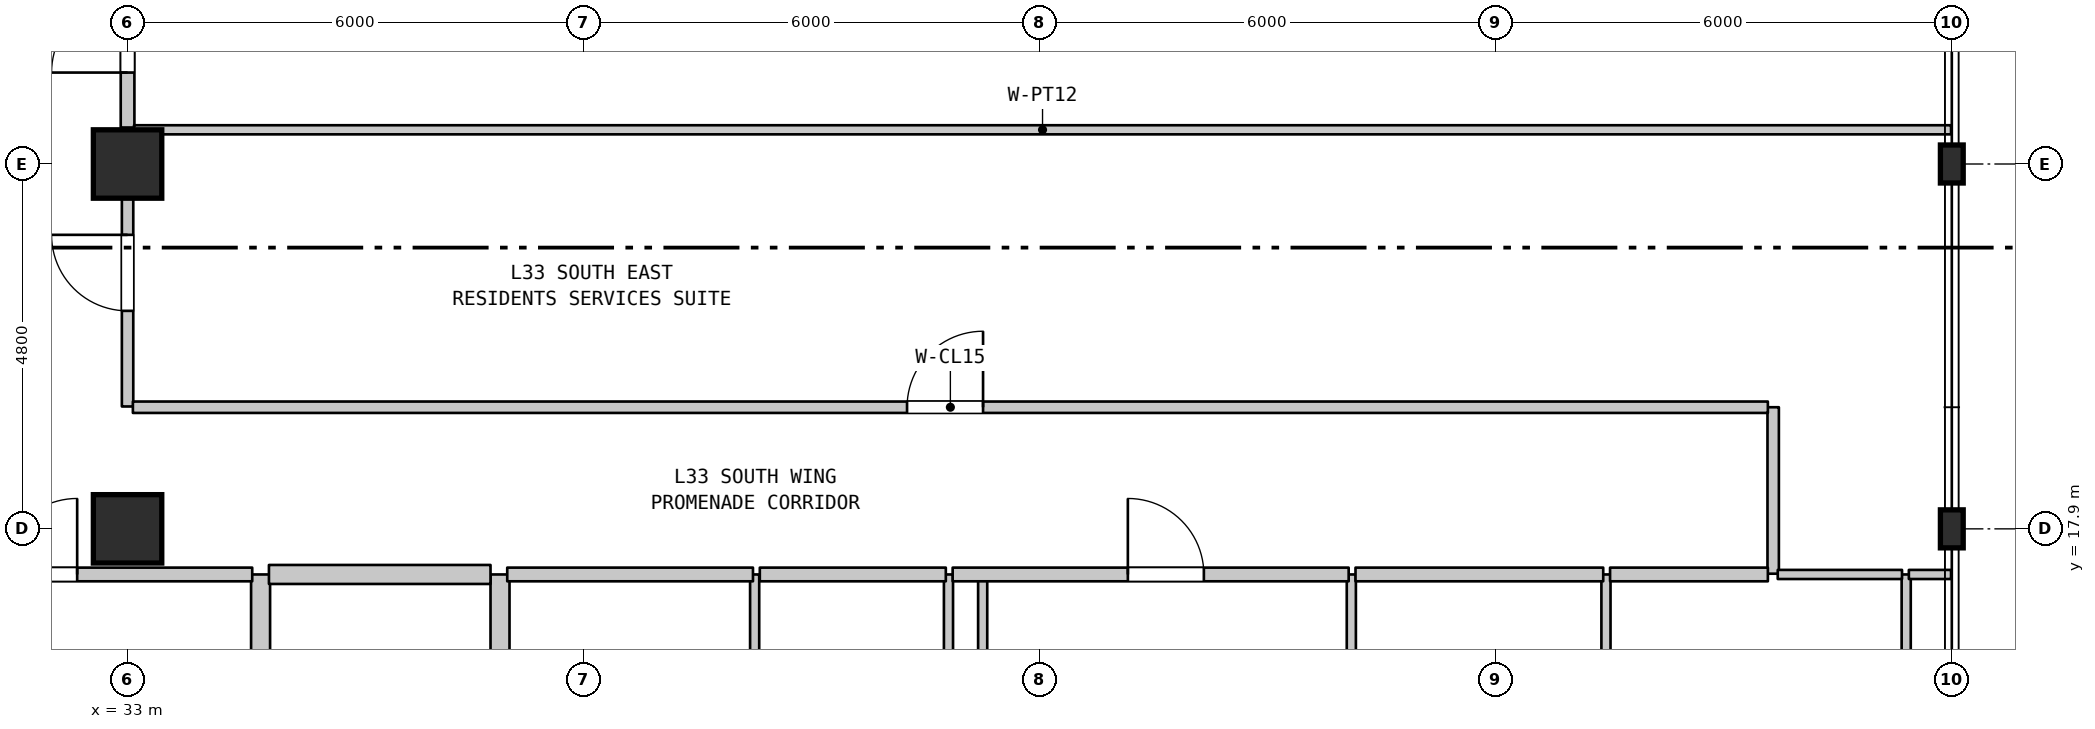
"""IFC4 building model, lengths in metres.
Left out: names, types, materials, properties, quantities, classifications, styles, units other than length and angle.
Written with IfcOpenShell. Run it as: python <this file> out.ifc"""

import sys

from ifc_helpers import new_model, si_unit, direction, frame, frame_2d, origin, origin_2d, place, context, subcontext, project, spatial, rectangle, i_section, extrude, element, fill, save


model = new_model("IFC4")
c1 = context("Model", 3, precision=1e-05, world=origin(), true_north=direction((0.0, 1.0)))
c2 = subcontext(c1, "Body", "Model", "MODEL_VIEW")
j1 = project(units=[si_unit("LENGTHUNIT", "METRE"), si_unit("PLANEANGLEUNIT", "RADIAN")], contexts=[c1])
p1 = place(None, origin())
s1 = spatial("IfcSite", under=j1, at=p1, CompositionType="ELEMENT")
p2 = place(p1, origin())
s2 = spatial("IfcBuilding", under=s1, at=p2, CompositionType="ELEMENT")
p3 = place(p2, frame((0.0, 0.0, 137.2)))
s3 = spatial("IfcBuildingStorey", under=s2, at=p3, CompositionType="ELEMENT", Elevation=137.2)
for number, where, z_axis, x_axis in (
    (1, (33.0, 17.9, 0.0), (0.0, 0.0, 1.0), (1.0, 0.0, 0.0)),
    (2, (33.0, 22.7, 0.0), (0.0, 0.0, 1.0), (1.0, 0.0, 0.0)),
):
    element("IfcColumn", number, at=place(p3, frame(where, z_axis=z_axis, x_axis=x_axis)), inside=s3, PredefinedType="COLUMN", context=c2, shape_type="SweptSolid", body=[
        extrude(rectangle(XDim=0.9, YDim=0.9, at=origin_2d()), origin(), (0.0, 0.0, 1.0), 3.7),
    ])
for number, where, z_axis, x_axis in (
    (3, (57.0, 17.9, 0.0), (0.0, 0.0, 1.0), (1.0, 0.0, 0.0)),
    (4, (57.0, 22.7, 0.0), (0.0, 0.0, 1.0), (1.0, 0.0, 0.0)),
):
    element("IfcColumn", number, at=place(p3, frame(where, z_axis=z_axis, x_axis=x_axis)), inside=s3, PredefinedType="COLUMN", context=c2, shape_type="SweptSolid", body=[
        extrude(i_section(OverallWidth=0.3, OverallDepth=0.5, WebThickness=0.014, FlangeThickness=0.028, FilletRadius=0.027, at=origin_2d()), origin(), (0.0, 0.0, 1.0), 3.7),
    ])
p4 = place(p3, frame((33.0, 19.51, 0.0), z_axis=(0.0, 0.0, 1.0), x_axis=(0.0, 1.0, 0.0)))
e5 = element("IfcWall", 5, at=p4, inside=s3, PredefinedType="STANDARD", context=c2, shape_type="SweptSolid", body=[
    extrude(rectangle(XDim=3.66, YDim=0.15, at=frame_2d((1.83, 0.0))), origin(), (0.0, 0.0, 1.0), 2.935),
])
p5 = place(p4, frame((1.258, 0.0, 0.0)))
e6 = element("IfcOpeningElement", 6, at=p5, cuts=e5, PredefinedType="OPENING", context=c2, shape_type="SweptSolid", body=[
    extrude(rectangle(XDim=1.0, YDim=2.15, at=frame_2d((0.5, 1.075))), frame((0.0, 0.085, 0.0), z_axis=(0.0, -1.0, 0.0), x_axis=(1.0, 0.0, 0.0)), (0.0, 0.0, 1.0), 0.17),
])
p6 = place(p3, frame((33.0, 23.18, 0.0), z_axis=(0.0, 0.0, 1.0), x_axis=(0.0, 1.0, 0.0)))
e7 = element("IfcWall", 7, at=p6, inside=s3, PredefinedType="STANDARD", context=c2, shape_type="SweptSolid", body=[
    extrude(rectangle(XDim=2.6, YDim=0.18, at=frame_2d((1.3, 0.0))), origin(), (0.0, 0.0, 1.0), 2.935),
])
p7 = place(p6, frame((0.723, 0.0, 0.0)))
e8 = element("IfcOpeningElement", 8, at=p7, cuts=e7, PredefinedType="OPENING", context=c2, shape_type="SweptSolid", body=[
    extrude(rectangle(XDim=1.0, YDim=2.15, at=frame_2d((0.5, 1.075))), frame((0.0, 0.1, 0.0), z_axis=(0.0, -1.0, 0.0), x_axis=(1.0, 0.0, 0.0)), (0.0, 0.0, 1.0), 0.2),
])
for number, where, z_axis, x_axis in (
    (9, (34.75, 11.15, 0.0), (0.0, 0.0, 1.0), (0.0, 1.0, 0.0)),
    (10, (37.9, 11.15, 0.0), (0.0, 0.0, 1.0), (0.0, 1.0, 0.0)),
):
    element("IfcWall", number, at=place(p3, frame(where, z_axis=z_axis, x_axis=x_axis)), inside=s3, PredefinedType="STANDARD", context=c2, shape_type="SweptSolid", body=[
        extrude(rectangle(XDim=6.15, YDim=0.25, at=frame_2d((3.075, 0.0))), origin(), (0.0, 0.0, 1.0), 3.385),
    ])
for number, where, z_axis, x_axis in (
    (11, (41.25, 11.15, 0.0), (0.0, 0.0, 1.0), (0.0, 1.0, 0.0)),
    (12, (43.8, 11.15, 0.0), (0.0, 0.0, 1.0), (0.0, 1.0, 0.0)),
):
    element("IfcWall", number, at=place(p3, frame(where, z_axis=z_axis, x_axis=x_axis)), inside=s3, PredefinedType="PARTITIONING", context=c2, shape_type="SweptSolid", body=[
        extrude(rectangle(XDim=6.15, YDim=0.12, at=frame_2d((3.075, 0.0))), origin(), (0.0, 0.0, 1.0), 3.385),
    ])
p8 = place(p3, frame((44.25, 14.85, 0.0), z_axis=(0.0, 0.0, 1.0), x_axis=(0.0, 1.0, 0.0)))
e13 = element("IfcWall", 13, at=p8, inside=s3, PredefinedType="PARTITIONING", context=c2, shape_type="SweptSolid", body=[
    extrude(rectangle(XDim=2.45, YDim=0.12, at=frame_2d((1.225, 0.0))), origin(), (0.0, 0.0, 1.0), 3.385),
])
for number, where, z_axis, x_axis in (
    (14, (49.1, 11.15, 0.0), (0.0, 0.0, 1.0), (0.0, 1.0, 0.0)),
    (15, (52.45, 11.15, 0.0), (0.0, 0.0, 1.0), (0.0, 1.0, 0.0)),
):
    element("IfcWall", number, at=place(p3, frame(where, z_axis=z_axis, x_axis=x_axis)), inside=s3, PredefinedType="PARTITIONING", context=c2, shape_type="SweptSolid", body=[
        extrude(rectangle(XDim=6.15, YDim=0.12, at=frame_2d((3.075, 0.0))), origin(), (0.0, 0.0, 1.0), 3.385),
    ])
p9 = place(p3, frame((54.65, 17.31, 0.0), z_axis=(0.0, 0.0, 1.0), x_axis=(0.0, 1.0, 0.0)))
e16 = element("IfcWall", 16, at=p9, inside=s3, PredefinedType="STANDARD", context=c2, shape_type="SweptSolid", body=[
    extrude(rectangle(XDim=2.19, YDim=0.15, at=frame_2d((1.095, 0.0))), origin(), (0.0, 0.0, 1.0), 3.385),
])
p10 = place(p3, frame((56.4, 11.15, 0.0), z_axis=(0.0, 0.0, 1.0), x_axis=(0.0, 1.0, 0.0)))
e17 = element("IfcWall", 17, at=p10, inside=s3, PredefinedType="PARTITIONING", context=c2, shape_type="SweptSolid", body=[
    extrude(rectangle(XDim=6.15, YDim=0.12, at=frame_2d((3.075, 0.0))), origin(), (0.0, 0.0, 1.0), 3.385),
])
p11 = place(p3, frame((29.545, 17.3, 0.0), z_axis=(0.0, 0.0, 1.0), x_axis=(1.0, 0.0, 0.0)))
e18 = element("IfcWall", 18, at=p11, inside=s3, PredefinedType="STANDARD", context=c2, shape_type="SweptSolid", body=[
    extrude(rectangle(XDim=5.095, YDim=0.18, at=frame_2d((2.547, 0.0))), origin(), (0.0, 0.0, 1.0), 3.385),
])
p12 = place(p11, frame((1.792, 0.0, 0.0)))
e19 = element("IfcOpeningElement", 19, at=p12, cuts=e18, PredefinedType="OPENING", context=c2, shape_type="SweptSolid", body=[
    extrude(rectangle(XDim=1.0, YDim=2.15, at=frame_2d((0.5, 1.075))), frame((0.0, 0.1, 0.0), z_axis=(0.0, -1.0, 0.0), x_axis=(1.0, 0.0, 0.0)), (0.0, 0.0, 1.0), 0.2),
])
p13 = place(p3, frame((34.86, 17.3, 0.0), z_axis=(0.0, 0.0, 1.0), x_axis=(1.0, 0.0, 0.0)))
e20 = element("IfcWall", 20, at=p13, inside=s3, PredefinedType="STANDARD", context=c2, shape_type="SweptSolid", body=[
    extrude(rectangle(XDim=2.915, YDim=0.25, at=frame_2d((1.458, 0.0))), origin(), (0.0, 0.0, 1.0), 3.385),
])
p14 = place(p3, frame((37.995, 17.3, 0.0), z_axis=(0.0, 0.0, 1.0), x_axis=(1.0, 0.0, 0.0)))
e21 = element("IfcWall", 21, at=p14, inside=s3, PredefinedType="STANDARD", context=c2, shape_type="SweptSolid", body=[
    extrude(rectangle(XDim=3.233, YDim=0.18, at=frame_2d((1.616, 0.0))), origin(), (0.0, 0.0, 1.0), 3.385),
])
p15 = place(p3, frame((41.318, 17.3, 0.0), z_axis=(0.0, 0.0, 1.0), x_axis=(1.0, 0.0, 0.0)))
e22 = element("IfcWall", 22, at=p15, inside=s3, PredefinedType="STANDARD", context=c2, shape_type="SweptSolid", body=[
    extrude(rectangle(XDim=2.447, YDim=0.18, at=frame_2d((1.223, 0.0))), origin(), (0.0, 0.0, 1.0), 3.385),
])
p16 = place(p3, frame((43.855, 17.3, 0.0), z_axis=(0.0, 0.0, 1.0), x_axis=(1.0, 0.0, 0.0)))
e23 = element("IfcWall", 23, at=p16, inside=s3, PredefinedType="STANDARD", context=c2, shape_type="SweptSolid", body=[
    extrude(rectangle(XDim=5.21, YDim=0.18, at=frame_2d((2.605, 0.0))), origin(), (0.0, 0.0, 1.0), 3.385),
])
p17 = place(p16, frame((2.305, 0.0, 0.0)))
e24 = element("IfcOpeningElement", 24, at=p17, cuts=e23, PredefinedType="OPENING", context=c2, shape_type="SweptSolid", body=[
    extrude(rectangle(XDim=1.0, YDim=2.15, at=frame_2d((0.5, 1.075))), frame((0.0, 0.1, 0.0), z_axis=(0.0, -1.0, 0.0), x_axis=(1.0, 0.0, 0.0)), (0.0, 0.0, 1.0), 0.2),
])
p18 = place(p3, frame((49.155, 17.3, 0.0), z_axis=(0.0, 0.0, 1.0), x_axis=(1.0, 0.0, 0.0)))
e25 = element("IfcWall", 25, at=p18, inside=s3, PredefinedType="STANDARD", context=c2, shape_type="SweptSolid", body=[
    extrude(rectangle(XDim=3.259, YDim=0.18, at=frame_2d((1.629, 0.0))), origin(), (0.0, 0.0, 1.0), 3.385),
])
p19 = place(p3, frame((52.504, 17.3, 0.0), z_axis=(0.0, 0.0, 1.0), x_axis=(1.0, 0.0, 0.0)))
e26 = element("IfcWall", 26, at=p19, inside=s3, PredefinedType="STANDARD", context=c2, shape_type="SweptSolid", body=[
    extrude(rectangle(XDim=2.076, YDim=0.18, at=frame_2d((1.038, 0.0))), origin(), (0.0, 0.0, 1.0), 3.385),
])
p20 = place(p3, frame((54.71, 17.3, 0.0), z_axis=(0.0, 0.0, 1.0), x_axis=(1.0, 0.0, 0.0)))
e27 = element("IfcWall", 27, at=p20, inside=s3, PredefinedType="PARTITIONING", context=c2, shape_type="SweptSolid", body=[
    extrude(rectangle(XDim=1.635, YDim=0.12, at=frame_2d((0.817, 0.0))), origin(), (0.0, 0.0, 1.0), 3.385),
])
p21 = place(p3, frame((56.435, 17.3, 0.0), z_axis=(0.0, 0.0, 1.0), x_axis=(1.0, 0.0, 0.0)))
e28 = element("IfcWall", 28, at=p21, inside=s3, PredefinedType="PARTITIONING", context=c2, shape_type="SweptSolid", body=[
    extrude(rectangle(XDim=0.555, YDim=0.12, at=frame_2d((0.277, 0.0))), origin(), (0.0, 0.0, 1.0), 3.385),
])
p22 = place(p3, frame((33.07, 19.5, 0.0), z_axis=(0.0, 0.0, 1.0), x_axis=(1.0, 0.0, 0.0)))
e29 = element("IfcWall", 29, at=p22, inside=s3, PredefinedType="STANDARD", context=c2, shape_type="SweptSolid", body=[
    extrude(rectangle(XDim=21.51, YDim=0.15, at=frame_2d((10.755, 0.0))), origin(), (0.0, 0.0, 1.0), 3.385),
])
p23 = place(p22, frame((10.185, 0.0, 0.0)))
e30 = element("IfcOpeningElement", 30, at=p23, cuts=e29, PredefinedType="OPENING", context=c2, shape_type="SweptSolid", body=[
    extrude(rectangle(XDim=1.0, YDim=2.15, at=frame_2d((0.5, 1.075))), frame((0.0, 0.085, 0.0), z_axis=(0.0, -1.0, 0.0), x_axis=(1.0, 0.0, 0.0)), (0.0, 0.0, 1.0), 0.17),
])
p24 = place(p3, frame((33.085, 23.15, 0.0), z_axis=(0.0, 0.0, 1.0), x_axis=(1.0, 0.0, 0.0)))
e31 = element("IfcWall", 31, at=p24, inside=s3, PredefinedType="PARTITIONING", context=c2, shape_type="SweptSolid", body=[
    extrude(rectangle(XDim=23.905, YDim=0.12, at=frame_2d((11.953, 0.0))), origin(), (0.0, 0.0, 1.0), 3.385),
])
p25 = place(p5, origin())
e32 = element("IfcDoor", 32, at=p25, inside=s3, OperationType="SINGLE_SWING_RIGHT", PredefinedType="DOOR", context=c2, shape_type="SweptSolid", body=[
    extrude(rectangle(XDim=1.0, YDim=2.15, at=frame_2d((0.5, 1.075))), frame((0.0, 0.025, 0.0), z_axis=(0.0, -1.0, 0.0), x_axis=(1.0, 0.0, 0.0)), (0.0, 0.0, 1.0), 0.05),
])
fill(e6, e32)
p26 = place(p7, origin())
e33 = element("IfcDoor", 33, at=p26, inside=s3, OperationType="SINGLE_SWING_LEFT", PredefinedType="DOOR", context=c2, shape_type="SweptSolid", body=[
    extrude(rectangle(XDim=1.0, YDim=2.15, at=frame_2d((0.5, 1.075))), frame((0.0, 0.025, 0.0), z_axis=(0.0, -1.0, 0.0), x_axis=(1.0, 0.0, 0.0)), (0.0, 0.0, 1.0), 0.05),
])
fill(e8, e33)
p27 = place(p12, origin())
e34 = element("IfcDoor", 34, at=p27, inside=s3, OperationType="SINGLE_SWING_RIGHT", PredefinedType="DOOR", context=c2, shape_type="SweptSolid", body=[
    extrude(rectangle(XDim=1.0, YDim=2.15, at=frame_2d((0.5, 1.075))), frame((0.0, 0.025, 0.0), z_axis=(0.0, -1.0, 0.0), x_axis=(1.0, 0.0, 0.0)), (0.0, 0.0, 1.0), 0.05),
])
fill(e19, e34)
p28 = place(p17, origin())
e35 = element("IfcDoor", 35, at=p28, inside=s3, OperationType="SINGLE_SWING_LEFT", PredefinedType="DOOR", context=c2, shape_type="SweptSolid", body=[
    extrude(rectangle(XDim=1.0, YDim=2.15, at=frame_2d((0.5, 1.075))), frame((0.0, 0.025, 0.0), z_axis=(0.0, -1.0, 0.0), x_axis=(1.0, 0.0, 0.0)), (0.0, 0.0, 1.0), 0.05),
])
fill(e24, e35)
p29 = place(p23, origin())
e36 = element("IfcDoor", 36, at=p29, inside=s3, OperationType="SINGLE_SWING_RIGHT", PredefinedType="DOOR", context=c2, shape_type="SweptSolid", body=[
    extrude(rectangle(XDim=1.0, YDim=2.15, at=frame_2d((0.5, 1.075))), frame((0.0, 0.025, 0.0), z_axis=(0.0, -1.0, 0.0), x_axis=(1.0, 0.0, 0.0)), (0.0, 0.0, 1.0), 0.05),
])
fill(e30, e36)
save(model, sys.argv[1])
